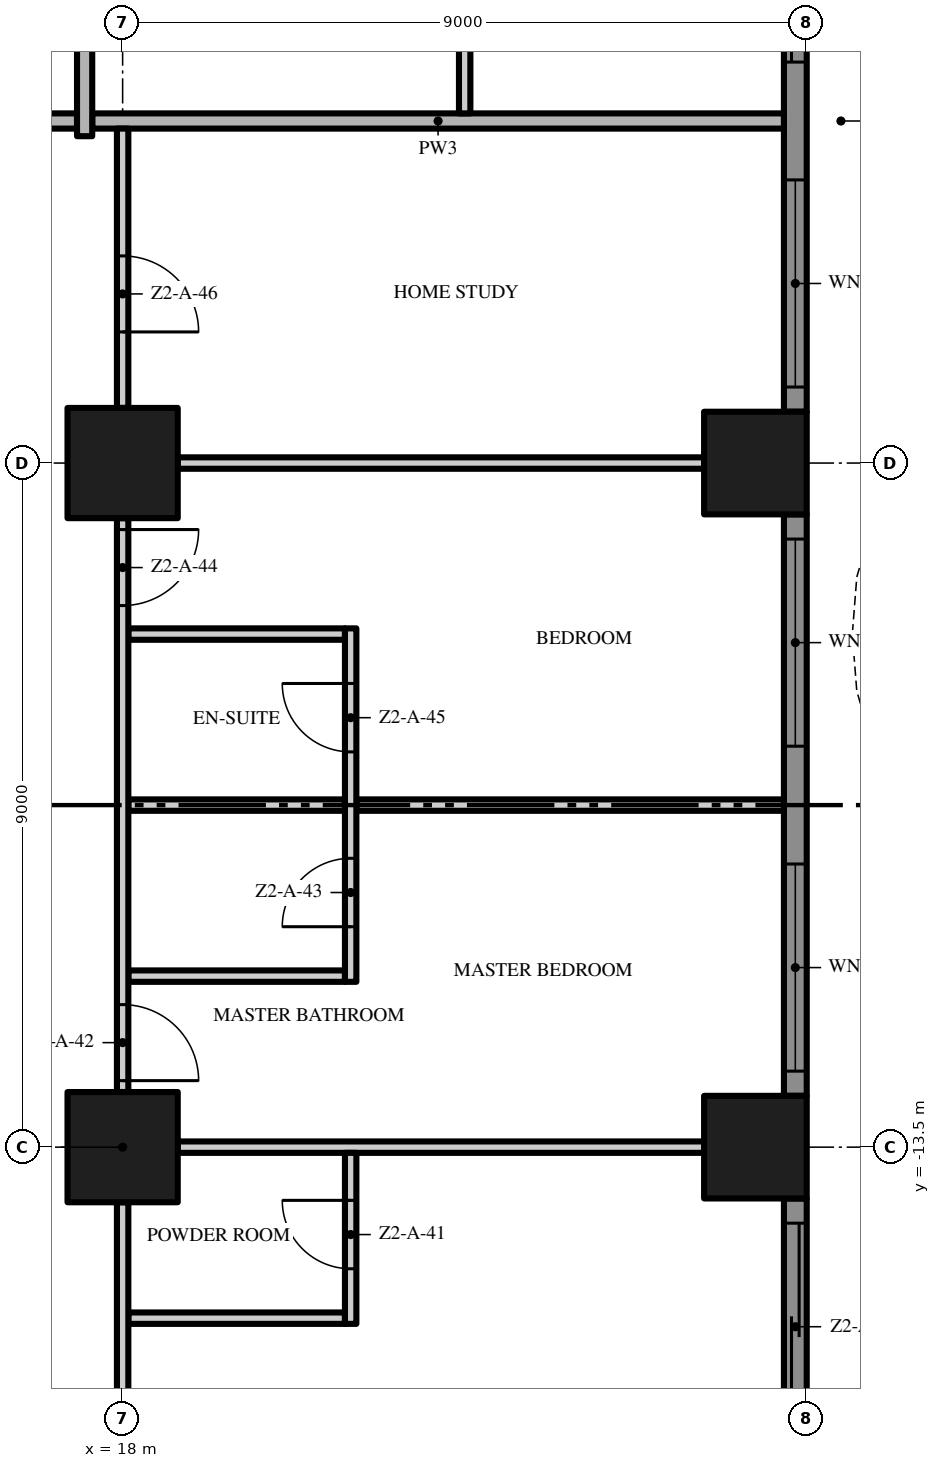
"""IFC4 building model, lengths in metres.
Left out: names, types, materials, properties, quantities, classifications, styles, units other than length and angle.
Written with IfcOpenShell. Run it as: python <this file> out.ifc"""

import sys

from ifc_helpers import new_model, si_unit, direction, frame, frame_2d, origin, origin_2d, place, context, subcontext, project, spatial, polyline, rectangle, outline, extrude, element, fill, save


model = new_model("IFC4")
c1 = context("Model", 3, precision=1e-05, world=origin(), true_north=direction((0.0, 1.0)))
c2 = subcontext(c1, "Body", "Model", "MODEL_VIEW")
j1 = project(units=[si_unit("LENGTHUNIT", "METRE"), si_unit("PLANEANGLEUNIT", "RADIAN")], contexts=[c1])
p1 = place(None, origin())
s1 = spatial("IfcSite", under=j1, at=p1, CompositionType="ELEMENT")
p2 = place(p1, origin())
s2 = spatial("IfcBuilding", under=s1, at=p2, CompositionType="ELEMENT")
p3 = place(p2, frame((0.0, 0.0, 77.0)))
s3 = spatial("IfcBuildingStorey", under=s2, at=p3, CompositionType="ELEMENT", Elevation=77.0)
for number, where, z_axis, x_axis in (
    (1, (18.0, -13.5, 0.0), (0.0, 0.0, 1.0), (1.0, 0.0, 0.0)),
    (2, (18.0, -4.5, 0.0), (0.0, 0.0, 1.0), (1.0, 0.0, 0.0)),
):
    element("IfcColumn", number, at=place(p3, frame(where, z_axis=z_axis, x_axis=x_axis)), inside=s3, PredefinedType="COLUMN", context=c2, shape_type="SweptSolid", body=[
        extrude(rectangle(XDim=1.45, YDim=1.45, at=origin_2d()), origin(), (0.0, 0.0, 1.0), 3.5),
    ])
for number, where, z_axis, x_axis in (
    (3, (26.325, -13.5, 0.0), (0.0, 0.0, 1.0), (1.0, 0.0, 0.0)),
    (4, (26.325, -4.5, 0.0), (0.0, 0.0, 1.0), (1.0, 0.0, 0.0)),
):
    element("IfcColumn", number, at=place(p3, frame(where, z_axis=z_axis, x_axis=x_axis)), inside=s3, PredefinedType="COLUMN", context=c2, shape_type="SweptSolid", body=[
        extrude(rectangle(XDim=1.35, YDim=1.35, at=origin_2d()), origin(), (0.0, 0.0, 1.0), 3.5),
    ])
p4 = place(p3, frame((26.85, -14.175, 0.0), z_axis=(0.0, 0.0, 1.0), x_axis=(0.0, -1.0, 0.0)))
e5 = element("IfcWall", 5, at=p4, inside=s3, PredefinedType="SOLIDWALL", context=c2, shape_type="SweptSolid", body=[
    extrude(rectangle(XDim=3.525, YDim=0.3, at=frame_2d((1.762, 0.0))), origin(), (0.0, 0.0, 1.0), 3.5),
])
p5 = place(p4, frame((0.325, 0.0, 0.0)))
e6 = element("IfcOpeningElement", 6, at=p5, cuts=e5, PredefinedType="OPENING", context=c2, shape_type="SweptSolid", body=[
    extrude(rectangle(XDim=2.725, YDim=2.4, at=frame_2d((1.363, 1.2))), frame((0.0, 0.16, 0.0), z_axis=(0.0, -1.0, 0.0), x_axis=(1.0, 0.0, 0.0)), (0.0, 0.0, 1.0), 0.32),
])
p6 = place(p3, frame((26.85, -5.175, 0.0), z_axis=(0.0, 0.0, 1.0), x_axis=(0.0, -1.0, 0.0)))
e7 = element("IfcWall", 7, at=p6, inside=s3, PredefinedType="SOLIDWALL", context=c2, shape_type="SweptSolid", body=[
    extrude(rectangle(XDim=7.65, YDim=0.3, at=frame_2d((3.825, 0.0))), origin(), (0.0, 0.0, 1.0), 3.5),
])
p7 = place(p6, frame((4.6, 0.0, 0.45)))
e8 = element("IfcOpeningElement", 8, at=p7, cuts=e7, PredefinedType="OPENING", context=c2, shape_type="SweptSolid", body=[
    extrude(rectangle(XDim=2.725, YDim=2.65, at=frame_2d((1.363, 1.325))), frame((0.0, 0.16, 0.0), z_axis=(0.0, -1.0, 0.0), x_axis=(1.0, 0.0, 0.0)), (0.0, 0.0, 1.0), 0.32),
])
p8 = place(p6, frame((0.325, 0.0, 0.45)))
e9 = element("IfcOpeningElement", 9, at=p8, cuts=e7, PredefinedType="OPENING", context=c2, shape_type="SweptSolid", body=[
    extrude(rectangle(XDim=2.725, YDim=2.65, at=frame_2d((1.363, 1.325))), frame((0.0, 0.16, 0.0), z_axis=(0.0, -1.0, 0.0), x_axis=(1.0, 0.0, 0.0)), (0.0, 0.0, 1.0), 0.32),
])
p9 = place(p3, frame((26.85, 3.825, 0.0), z_axis=(0.0, 0.0, 1.0), x_axis=(0.0, -1.0, 0.0)))
e10 = element("IfcWall", 10, at=p9, inside=s3, PredefinedType="SOLIDWALL", context=c2, shape_type="SweptSolid", body=[
    extrude(rectangle(XDim=7.65, YDim=0.3, at=frame_2d((3.825, 0.0))), origin(), (0.0, 0.0, 1.0), 3.5),
])
p10 = place(p9, frame((4.6, 0.0, 0.45)))
e11 = element("IfcOpeningElement", 11, at=p10, cuts=e10, PredefinedType="OPENING", context=c2, shape_type="SweptSolid", body=[
    extrude(rectangle(XDim=2.725, YDim=2.65, at=frame_2d((1.363, 1.325))), frame((0.0, 0.16, 0.0), z_axis=(0.0, -1.0, 0.0), x_axis=(1.0, 0.0, 0.0)), (0.0, 0.0, 1.0), 0.32),
])
p11 = place(p9, frame((0.325, 0.0, 0.0)))
e12 = element("IfcOpeningElement", 12, at=p11, cuts=e10, PredefinedType="OPENING", context=c2, shape_type="SweptSolid", body=[
    extrude(rectangle(XDim=2.725, YDim=2.4, at=frame_2d((1.363, 1.2))), frame((0.0, 0.16, 0.0), z_axis=(0.0, -1.0, 0.0), x_axis=(1.0, 0.0, 0.0)), (0.0, 0.0, 1.0), 0.32),
])
p12 = place(p3, origin())
e13 = element("IfcWall", 13, at=p12, inside=s3, PredefinedType="USERDEFINED", context=c2, shape_type="SweptSolid", body=[
    extrude(outline(polyline([(28.8, -18.0), (29.505, -16.5), (29.941, -15.0), (30.0, -14.25), (29.941, -13.5), (29.505, -12.0), (28.8, -10.5), (28.095, -9.0), (27.659, -7.5), (27.6, -6.75), (27.659, -6.0), (28.095, -4.5), (28.8, -3.0), (29.505, -1.5), (29.941, 0.0), (30.0, 0.75), (29.941, 1.5), (29.505, 3.0), (28.8, 4.5), (28.095, 6.0), (27.659, 7.5), (27.6, 8.25), (27.659, 9.0), (28.095, 10.5), (28.8, 12.0), (29.505, 13.5), (29.941, 15.0), (30.0, 15.75), (29.941, 16.5), (29.505, 18.0), (29.265, 17.93), (29.694, 16.455), (29.749, 15.75), (29.694, 15.045), (29.271, 13.589), (28.574, 12.106), (27.86, 10.589), (27.411, 9.045), (27.349, 8.25), (27.411, 7.455), (27.86, 5.911), (28.574, 4.394), (29.271, 2.911), (29.694, 1.455), (29.749, 0.75), (29.694, 0.045), (29.271, -1.411), (28.574, -2.894), (27.86, -4.411), (27.411, -5.955), (27.349, -6.75), (27.411, -7.545), (27.86, -9.089), (28.574, -10.606), (29.271, -12.089), (29.694, -13.545), (29.749, -14.25), (29.694, -14.955), (29.271, -16.411), (28.574, -17.894), (28.8, -18.0)])), origin(), (0.0, 0.0, 1.0), 0.9),
])
p13 = place(p3, frame((18.075, -15.75, 0.0), z_axis=(0.0, 0.0, 1.0), x_axis=(1.0, 0.0, 0.0)))
e14 = element("IfcWall", 14, at=p13, inside=s3, PredefinedType="PARTITIONING", context=c2, shape_type="SweptSolid", body=[
    extrude(rectangle(XDim=2.85, YDim=0.15, at=frame_2d((1.425, 0.0))), origin(), (0.0, 0.0, 1.0), 3.5),
])
p14 = place(p3, frame((18.725, -13.5, 0.0), z_axis=(0.0, 0.0, 1.0), x_axis=(1.0, 0.0, 0.0)))
e15 = element("IfcWall", 15, at=p14, inside=s3, PredefinedType="PARTITIONING", context=c2, shape_type="SweptSolid", body=[
    extrude(rectangle(XDim=6.925, YDim=0.15, at=frame_2d((3.462, 0.0))), origin(), (0.0, 0.0, 1.0), 3.5),
])
for number, where, z_axis, x_axis in (
    (16, (18.075, -11.25, 0.0), (0.0, 0.0, 1.0), (1.0, 0.0, 0.0)),
    (17, (18.075, -9.0, 0.0), (0.0, 0.0, 1.0), (1.0, 0.0, 0.0)),
):
    element("IfcWall", number, at=place(p3, frame(where, z_axis=z_axis, x_axis=x_axis)), inside=s3, PredefinedType="PARTITIONING", context=c2, shape_type="SweptSolid", body=[
        extrude(rectangle(XDim=2.85, YDim=0.15, at=frame_2d((1.425, 0.0))), origin(), (0.0, 0.0, 1.0), 3.5),
    ])
p15 = place(p3, frame((21.075, -9.0, 0.0), z_axis=(0.0, 0.0, 1.0), x_axis=(1.0, 0.0, 0.0)))
e18 = element("IfcWall", 18, at=p15, inside=s3, PredefinedType="PARTITIONING", context=c2, shape_type="SweptSolid", body=[
    extrude(rectangle(XDim=5.625, YDim=0.15, at=frame_2d((2.812, 0.0))), origin(), (0.0, 0.0, 1.0), 3.5),
])
p16 = place(p3, frame((18.075, -6.75, 0.0), z_axis=(0.0, 0.0, 1.0), x_axis=(1.0, 0.0, 0.0)))
e19 = element("IfcWall", 19, at=p16, inside=s3, PredefinedType="PARTITIONING", context=c2, shape_type="SweptSolid", body=[
    extrude(rectangle(XDim=2.85, YDim=0.15, at=frame_2d((1.425, 0.0))), origin(), (0.0, 0.0, 1.0), 3.5),
])
p17 = place(p3, frame((18.725, -4.5, 0.0), z_axis=(0.0, 0.0, 1.0), x_axis=(1.0, 0.0, 0.0)))
e20 = element("IfcWall", 20, at=p17, inside=s3, PredefinedType="PARTITIONING", context=c2, shape_type="SweptSolid", body=[
    extrude(rectangle(XDim=6.925, YDim=0.15, at=frame_2d((3.462, 0.0))), origin(), (0.0, 0.0, 1.0), 3.5),
])
p18 = place(p3, frame((4.6, 0.0, 0.0), z_axis=(0.0, 0.0, 1.0), x_axis=(1.0, 0.0, 0.0)))
e21 = element("IfcWall", 21, at=p18, inside=s3, PredefinedType="PARTITIONING", context=c2, shape_type="SweptSolid", body=[
    extrude(rectangle(XDim=12.8, YDim=0.2, at=frame_2d((6.4, 0.0))), origin(), (0.0, 0.0, 1.0), 3.5),
])
p19 = place(p3, frame((17.6, 0.0, 0.0), z_axis=(0.0, 0.0, 1.0), x_axis=(1.0, 0.0, 0.0)))
e22 = element("IfcWall", 22, at=p19, inside=s3, PredefinedType="PARTITIONING", context=c2, shape_type="SweptSolid", body=[
    extrude(rectangle(XDim=9.1, YDim=0.2, at=frame_2d((4.55, 0.0))), origin(), (0.0, 0.0, 1.0), 3.5),
])
p20 = place(p3, frame((17.5, -0.2, 0.0), z_axis=(0.0, 0.0, 1.0), x_axis=(0.0, 1.0, 0.0)))
e23 = element("IfcWall", 23, at=p20, inside=s3, PredefinedType="PARTITIONING", context=c2, shape_type="SweptSolid", body=[
    extrude(rectangle(XDim=3.975, YDim=0.2, at=frame_2d((1.988, 0.0))), origin(), (0.0, 0.0, 1.0), 3.5),
])
p21 = place(p3, frame((18.0, -14.225, 0.0), z_axis=(0.0, 0.0, 1.0), x_axis=(0.0, -1.0, 0.0)))
e24 = element("IfcWall", 24, at=p21, inside=s3, PredefinedType="PARTITIONING", context=c2, shape_type="SweptSolid", body=[
    extrude(rectangle(XDim=6.925, YDim=0.15, at=frame_2d((3.462, 0.0))), origin(), (0.0, 0.0, 1.0), 3.5),
])
p22 = place(p21, frame((4.025, 0.0, 0.0)))
e25 = element("IfcOpeningElement", 25, at=p22, cuts=e24, PredefinedType="OPENING", context=c2, shape_type="SweptSolid", body=[
    extrude(rectangle(XDim=1.8, YDim=2.4, at=frame_2d((0.9, 1.2))), frame((0.0, 0.085, 0.0), z_axis=(0.0, -1.0, 0.0), x_axis=(1.0, 0.0, 0.0)), (0.0, 0.0, 1.0), 0.17),
])
p23 = place(p3, frame((18.0, -5.225, 0.0), z_axis=(0.0, 0.0, 1.0), x_axis=(0.0, -1.0, 0.0)))
e26 = element("IfcWall", 26, at=p23, inside=s3, PredefinedType="PARTITIONING", context=c2, shape_type="SweptSolid", body=[
    extrude(rectangle(XDim=7.55, YDim=0.15, at=frame_2d((3.775, 0.0))), origin(), (0.0, 0.0, 1.0), 3.5),
])
p24 = place(p23, frame((6.4, 0.0, 0.0)))
e27 = element("IfcOpeningElement", 27, at=p24, cuts=e26, PredefinedType="OPENING", context=c2, shape_type="SweptSolid", body=[
    extrude(rectangle(XDim=1.0, YDim=2.4, at=frame_2d((0.5, 1.2))), frame((0.0, 0.085, 0.0), z_axis=(0.0, -1.0, 0.0), x_axis=(1.0, 0.0, 0.0)), (0.0, 0.0, 1.0), 0.17),
])
p25 = place(p23, frame((0.15, 0.0, 0.0)))
e28 = element("IfcOpeningElement", 28, at=p25, cuts=e26, PredefinedType="OPENING", context=c2, shape_type="SweptSolid", body=[
    extrude(rectangle(XDim=1.0, YDim=2.4, at=frame_2d((0.5, 1.2))), frame((0.0, 0.085, 0.0), z_axis=(0.0, -1.0, 0.0), x_axis=(1.0, 0.0, 0.0)), (0.0, 0.0, 1.0), 0.17),
])
p26 = place(p3, frame((18.0, -0.1, 0.0), z_axis=(0.0, 0.0, 1.0), x_axis=(0.0, -1.0, 0.0)))
e29 = element("IfcWall", 29, at=p26, inside=s3, PredefinedType="PARTITIONING", context=c2, shape_type="SweptSolid", body=[
    extrude(rectangle(XDim=3.675, YDim=0.15, at=frame_2d((1.837, 0.0))), origin(), (0.0, 0.0, 1.0), 3.5),
])
p27 = place(p26, frame((1.675, 0.0, 0.0)))
e30 = element("IfcOpeningElement", 30, at=p27, cuts=e29, PredefinedType="OPENING", context=c2, shape_type="SweptSolid", body=[
    extrude(rectangle(XDim=1.0, YDim=2.4, at=frame_2d((0.5, 1.2))), frame((0.0, 0.085, 0.0), z_axis=(0.0, -1.0, 0.0), x_axis=(1.0, 0.0, 0.0)), (0.0, 0.0, 1.0), 0.17),
])
p28 = place(p3, frame((21.0, -15.825, 0.0), z_axis=(0.0, 0.0, 1.0), x_axis=(0.0, 1.0, 0.0)))
e31 = element("IfcWall", 31, at=p28, inside=s3, PredefinedType="PARTITIONING", context=c2, shape_type="SweptSolid", body=[
    extrude(rectangle(XDim=2.25, YDim=0.15, at=frame_2d((1.125, 0.0))), origin(), (0.0, 0.0, 1.0), 3.5),
])
p29 = place(p28, frame((0.725, 0.0, 0.0)))
e32 = element("IfcOpeningElement", 32, at=p29, cuts=e31, PredefinedType="OPENING", context=c2, shape_type="SweptSolid", body=[
    extrude(rectangle(XDim=0.9, YDim=2.1, at=frame_2d((0.45, 1.05))), frame((0.0, 0.085, 0.0), z_axis=(0.0, -1.0, 0.0), x_axis=(1.0, 0.0, 0.0)), (0.0, 0.0, 1.0), 0.17),
])
p30 = place(p3, frame((21.0, -11.325, 0.0), z_axis=(0.0, 0.0, 1.0), x_axis=(0.0, 1.0, 0.0)))
e33 = element("IfcWall", 33, at=p30, inside=s3, PredefinedType="PARTITIONING", context=c2, shape_type="SweptSolid", body=[
    extrude(rectangle(XDim=4.65, YDim=0.15, at=frame_2d((2.325, 0.0))), origin(), (0.0, 0.0, 1.0), 3.5),
])
p31 = place(p30, frame((0.725, 0.0, 0.0)))
e34 = element("IfcOpeningElement", 34, at=p31, cuts=e33, PredefinedType="OPENING", context=c2, shape_type="SweptSolid", body=[
    extrude(rectangle(XDim=0.9, YDim=2.1, at=frame_2d((0.45, 1.05))), frame((0.0, 0.085, 0.0), z_axis=(0.0, -1.0, 0.0), x_axis=(1.0, 0.0, 0.0)), (0.0, 0.0, 1.0), 0.17),
])
p32 = place(p30, frame((3.025, 0.0, 0.0)))
e35 = element("IfcOpeningElement", 35, at=p32, cuts=e33, PredefinedType="OPENING", context=c2, shape_type="SweptSolid", body=[
    extrude(rectangle(XDim=0.9, YDim=2.1, at=frame_2d((0.45, 1.05))), frame((0.0, 0.085, 0.0), z_axis=(0.0, -1.0, 0.0), x_axis=(1.0, 0.0, 0.0)), (0.0, 0.0, 1.0), 0.17),
])
p33 = place(p3, frame((22.5, 17.325, 0.0), z_axis=(0.0, 0.0, 1.0), x_axis=(0.0, -1.0, 0.0)))
e36 = element("IfcWall", 36, at=p33, inside=s3, PredefinedType="PARTITIONING", context=c2, shape_type="SweptSolid", body=[
    extrude(rectangle(XDim=17.225, YDim=0.15, at=frame_2d((8.613, 0.0))), origin(), (0.0, 0.0, 1.0), 3.5),
])
p34 = place(p33, frame((14.575, 0.0, 0.0)))
e37 = element("IfcOpeningElement", 37, at=p34, cuts=e36, PredefinedType="OPENING", context=c2, shape_type="SweptSolid", body=[
    extrude(rectangle(XDim=1.0, YDim=2.4, at=frame_2d((0.5, 1.2))), frame((0.0, 0.085, 0.0), z_axis=(0.0, -1.0, 0.0), x_axis=(1.0, 0.0, 0.0)), (0.0, 0.0, 1.0), 0.17),
])
p35 = place(p33, frame((7.425, 0.0, 0.0)))
e38 = element("IfcOpeningElement", 38, at=p35, cuts=e36, PredefinedType="OPENING", context=c2, shape_type="SweptSolid", body=[
    extrude(rectangle(XDim=1.8, YDim=2.4, at=frame_2d((0.9, 1.2))), frame((0.0, 0.085, 0.0), z_axis=(0.0, -1.0, 0.0), x_axis=(1.0, 0.0, 0.0)), (0.0, 0.0, 1.0), 0.17),
])
p36 = place(p33, frame((0.15, 0.0, 0.0)))
e39 = element("IfcOpeningElement", 39, at=p36, cuts=e36, PredefinedType="OPENING", context=c2, shape_type="SweptSolid", body=[
    extrude(rectangle(XDim=1.0, YDim=2.4, at=frame_2d((0.5, 1.2))), frame((0.0, 0.085, 0.0), z_axis=(0.0, -1.0, 0.0), x_axis=(1.0, 0.0, 0.0)), (0.0, 0.0, 1.0), 0.17),
])
p37 = place(p5, origin())
e40 = element("IfcDoor", 40, at=p37, inside=s3, OperationType="SINGLE_SWING_LEFT", PredefinedType="DOOR", context=c2, shape_type="SweptSolid", body=[
    extrude(rectangle(XDim=2.725, YDim=2.4, at=frame_2d((1.363, 1.2))), frame((0.0, 0.025, 0.0), z_axis=(0.0, -1.0, 0.0), x_axis=(1.0, 0.0, 0.0)), (0.0, 0.0, 1.0), 0.05),
])
fill(e6, e40)
p38 = place(p7, origin())
e41 = element("IfcWindow", 41, at=p38, inside=s3, PartitioningType="SINGLE_PANEL", PredefinedType="WINDOW", context=c2, shape_type="SweptSolid", body=[
    extrude(rectangle(XDim=2.725, YDim=2.65, at=frame_2d((1.363, 1.325))), frame((0.0, 0.03, 0.0), z_axis=(0.0, -1.0, 0.0), x_axis=(1.0, 0.0, 0.0)), (0.0, 0.0, 1.0), 0.06),
])
fill(e8, e41)
p39 = place(p8, origin())
e42 = element("IfcWindow", 42, at=p39, inside=s3, PartitioningType="SINGLE_PANEL", PredefinedType="WINDOW", context=c2, shape_type="SweptSolid", body=[
    extrude(rectangle(XDim=2.725, YDim=2.65, at=frame_2d((1.363, 1.325))), frame((0.0, 0.03, 0.0), z_axis=(0.0, -1.0, 0.0), x_axis=(1.0, 0.0, 0.0)), (0.0, 0.0, 1.0), 0.06),
])
fill(e9, e42)
p40 = place(p10, origin())
e43 = element("IfcWindow", 43, at=p40, inside=s3, PartitioningType="SINGLE_PANEL", PredefinedType="WINDOW", context=c2, shape_type="SweptSolid", body=[
    extrude(rectangle(XDim=2.725, YDim=2.65, at=frame_2d((1.363, 1.325))), frame((0.0, 0.03, 0.0), z_axis=(0.0, -1.0, 0.0), x_axis=(1.0, 0.0, 0.0)), (0.0, 0.0, 1.0), 0.06),
])
fill(e11, e43)
p41 = place(p11, origin())
e44 = element("IfcDoor", 44, at=p41, inside=s3, OperationType="SINGLE_SWING_LEFT", PredefinedType="DOOR", context=c2, shape_type="SweptSolid", body=[
    extrude(rectangle(XDim=2.725, YDim=2.4, at=frame_2d((1.363, 1.2))), frame((0.0, 0.025, 0.0), z_axis=(0.0, -1.0, 0.0), x_axis=(1.0, 0.0, 0.0)), (0.0, 0.0, 1.0), 0.05),
])
fill(e12, e44)
p42 = place(p29, origin())
e45 = element("IfcDoor", 45, at=p42, inside=s3, OperationType="SINGLE_SWING_RIGHT", PredefinedType="DOOR", context=c2, shape_type="SweptSolid", body=[
    extrude(rectangle(XDim=0.9, YDim=2.1, at=frame_2d((0.45, 1.05))), frame((0.0, 0.025, 0.0), z_axis=(0.0, -1.0, 0.0), x_axis=(1.0, 0.0, 0.0)), (0.0, 0.0, 1.0), 0.05),
])
fill(e32, e45)
p43 = place(p24, origin())
e46 = element("IfcDoor", 46, at=p43, inside=s3, OperationType="SINGLE_SWING_RIGHT", PredefinedType="DOOR", context=c2, shape_type="SweptSolid", body=[
    extrude(rectangle(XDim=1.0, YDim=2.4, at=frame_2d((0.5, 1.2))), frame((0.0, 0.025, 0.0), z_axis=(0.0, -1.0, 0.0), x_axis=(1.0, 0.0, 0.0)), (0.0, 0.0, 1.0), 0.05),
])
fill(e27, e46)
p44 = place(p31, origin())
e47 = element("IfcDoor", 47, at=p44, inside=s3, OperationType="SINGLE_SWING_LEFT", PredefinedType="DOOR", context=c2, shape_type="SweptSolid", body=[
    extrude(rectangle(XDim=0.9, YDim=2.1, at=frame_2d((0.45, 1.05))), frame((0.0, 0.025, 0.0), z_axis=(0.0, -1.0, 0.0), x_axis=(1.0, 0.0, 0.0)), (0.0, 0.0, 1.0), 0.05),
])
fill(e34, e47)
p45 = place(p25, origin())
e48 = element("IfcDoor", 48, at=p45, inside=s3, OperationType="SINGLE_SWING_LEFT", PredefinedType="DOOR", context=c2, shape_type="SweptSolid", body=[
    extrude(rectangle(XDim=1.0, YDim=2.4, at=frame_2d((0.5, 1.2))), frame((0.0, 0.025, 0.0), z_axis=(0.0, -1.0, 0.0), x_axis=(1.0, 0.0, 0.0)), (0.0, 0.0, 1.0), 0.05),
])
fill(e28, e48)
p46 = place(p32, origin())
e49 = element("IfcDoor", 49, at=p46, inside=s3, OperationType="SINGLE_SWING_RIGHT", PredefinedType="DOOR", context=c2, shape_type="SweptSolid", body=[
    extrude(rectangle(XDim=0.9, YDim=2.1, at=frame_2d((0.45, 1.05))), frame((0.0, 0.025, 0.0), z_axis=(0.0, -1.0, 0.0), x_axis=(1.0, 0.0, 0.0)), (0.0, 0.0, 1.0), 0.05),
])
fill(e35, e49)
p47 = place(p27, origin())
e50 = element("IfcDoor", 50, at=p47, inside=s3, OperationType="SINGLE_SWING_RIGHT", PredefinedType="DOOR", context=c2, shape_type="SweptSolid", body=[
    extrude(rectangle(XDim=1.0, YDim=2.4, at=frame_2d((0.5, 1.2))), frame((0.0, 0.025, 0.0), z_axis=(0.0, -1.0, 0.0), x_axis=(1.0, 0.0, 0.0)), (0.0, 0.0, 1.0), 0.05),
])
fill(e30, e50)
save(model, sys.argv[1])
